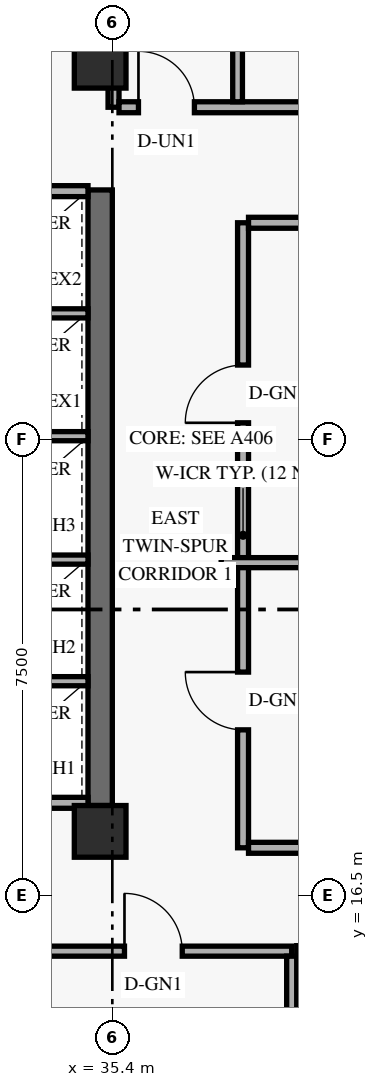
"""IFC4 building model, lengths in metres.
Left out: names, types, materials, properties, quantities, classifications, styles, units other than length and angle.
Written with IfcOpenShell. Run it as: python <this file> out.ifc"""

import sys

from ifc_helpers import new_model, si_unit, direction, frame, frame_2d, origin, origin_2d, place, context, subcontext, project, spatial, rectangle, extrude, element, fill, save


model = new_model("IFC4")
c1 = context("Model", 3, precision=1e-05, world=origin(), true_north=direction((0.0, 1.0)))
c2 = subcontext(c1, "Body", "Model", "MODEL_VIEW")
j1 = project(units=[si_unit("LENGTHUNIT", "METRE"), si_unit("PLANEANGLEUNIT", "RADIAN")], contexts=[c1])
p1 = place(None, origin())
s1 = spatial("IfcSite", under=j1, at=p1, CompositionType="ELEMENT")
p2 = place(p1, origin())
s2 = spatial("IfcBuilding", under=s1, at=p2, CompositionType="ELEMENT")
p3 = place(p2, frame((0.0, 0.0, 121.2)))
s3 = spatial("IfcBuildingStorey", under=s2, at=p3, CompositionType="ELEMENT", Elevation=121.2)
p4 = place(p3, frame((35.2, 17.975, 0.0), z_axis=(0.0, 0.0, 1.0), x_axis=(0.0, 1.0, 0.0)))
e1 = element("IfcWall", 1, at=p4, inside=s3, PredefinedType="SHEAR", context=c2, shape_type="SweptSolid", body=[
    extrude(rectangle(XDim=10.125, YDim=0.4, at=frame_2d((5.062, 0.0))), origin(), (0.0, 0.0, 1.0), 2.749),
])
for number, where, z_axis, x_axis in (
    (2, (35.2, 17.55, 0.0), (0.0, 0.0, 1.0), (1.0, 0.0, 0.0)),
    (3, (35.2, 30.2, 0.0), (0.0, 0.0, 1.0), (1.0, 0.0, 0.0)),
):
    element("IfcColumn", number, at=place(p3, frame(where, z_axis=z_axis, x_axis=x_axis)), inside=s3, PredefinedType="COLUMN", context=c2, shape_type="SweptSolid", body=[
        extrude(rectangle(XDim=0.85, YDim=0.85, at=origin_2d()), origin(), (0.0, 0.0, 1.0), 3.6),
    ])
for number, where, z_axis, x_axis in (
    (4, (32.74, 18.02, 0.0), (0.0, 0.0, 1.0), (1.0, 0.0, 0.0)),
    (5, (32.74, 28.08, 0.0), (0.0, 0.0, 1.0), (1.0, 0.0, 0.0)),
):
    element("IfcWall", number, at=place(p3, frame(where, z_axis=z_axis, x_axis=x_axis)), inside=s3, PredefinedType="STANDARD", context=c2, shape_type="SweptSolid", body=[
        extrude(rectangle(XDim=2.26, YDim=0.18, at=frame_2d((1.13, 0.0))), origin(), (0.0, 0.0, 1.0), 3.36),
    ])
for number, where, z_axis, x_axis in (
    (6, (32.74, 20.02, 0.0), (0.0, 0.0, 1.0), (1.0, 0.0, 0.0)),
    (7, (32.74, 22.02, 0.0), (0.0, 0.0, 1.0), (1.0, 0.0, 0.0)),
    (8, (32.74, 24.05, 0.0), (0.0, 0.0, 1.0), (1.0, 0.0, 0.0)),
    (9, (32.74, 26.07, 0.0), (0.0, 0.0, 1.0), (1.0, 0.0, 0.0)),
):
    element("IfcWall", number, at=place(p3, frame(where, z_axis=z_axis, x_axis=x_axis)), inside=s3, PredefinedType="STANDARD", context=c2, shape_type="SweptSolid", body=[
        extrude(rectangle(XDim=2.26, YDim=0.15, at=frame_2d((1.13, 0.0))), origin(), (0.0, 0.0, 1.0), 3.36),
    ])
p5 = place(p3, frame((32.732, 15.58, 0.0), z_axis=(0.0, 0.0, 1.0), x_axis=(1.0, 0.0, 0.0)))
e10 = element("IfcWall", 10, at=p5, inside=s3, PredefinedType="PARTITIONING", context=c2, shape_type="SweptSolid", body=[
    extrude(rectangle(XDim=5.618, YDim=0.165, at=frame_2d((2.809, 0.0))), origin(), (0.0, 0.0, 1.0), 2.731),
])
p6 = place(p5, frame((2.867, 0.0, 0.0)))
e11 = element("IfcOpeningElement", 11, at=p6, cuts=e10, PredefinedType="OPENING", context=c2, shape_type="SweptSolid", body=[
    extrude(rectangle(XDim=0.95, YDim=2.15, at=frame_2d((0.475, 1.075))), frame((0.0, 0.093, 0.0), z_axis=(0.0, -1.0, 0.0), x_axis=(1.0, 0.0, 0.0)), (0.0, 0.0, 1.0), 0.185),
])
p7 = place(p3, frame((38.35, 9.25, 0.0), z_axis=(0.0, 0.0, 1.0), x_axis=(0.0, 1.0, 0.0)))
e12 = element("IfcWall", 12, at=p7, inside=s3, PredefinedType="PARTITIONING", context=c2, shape_type="SweptSolid", body=[
    extrude(rectangle(XDim=6.248, YDim=0.165, at=frame_2d((3.124, 0.0))), origin(), (0.0, 0.0, 1.0), 2.731),
])
p8 = place(p3, frame((37.55, 17.28, 0.0), z_axis=(0.0, 0.0, 1.0), x_axis=(0.0, 1.0, 0.0)))
e13 = element("IfcWall", 13, at=p8, inside=s3, PredefinedType="STANDARD", context=c2, shape_type="SweptSolid", body=[
    extrude(rectangle(XDim=10.28, YDim=0.18, at=frame_2d((5.14, 0.0))), origin(), (0.0, 0.0, 1.0), 2.731),
])
p9 = place(p8, frame((1.94, 0.0, 0.0)))
e14 = element("IfcOpeningElement", 14, at=p9, cuts=e13, PredefinedType="OPENING", context=c2, shape_type="SweptSolid", body=[
    extrude(rectangle(XDim=0.95, YDim=2.15, at=frame_2d((0.475, 1.075))), frame((0.0, 0.1, 0.0), z_axis=(0.0, -1.0, 0.0), x_axis=(1.0, 0.0, 0.0)), (0.0, 0.0, 1.0), 0.2),
])
p10 = place(p8, frame((6.99, 0.0, 0.0)))
e15 = element("IfcOpeningElement", 15, at=p10, cuts=e13, PredefinedType="OPENING", context=c2, shape_type="SweptSolid", body=[
    extrude(rectangle(XDim=0.95, YDim=2.15, at=frame_2d((0.475, 1.075))), frame((0.0, 0.1, 0.0), z_axis=(0.0, -1.0, 0.0), x_axis=(1.0, 0.0, 0.0)), (0.0, 0.0, 1.0), 0.2),
])
p11 = place(p3, frame((38.433, 15.58, 0.0), z_axis=(0.0, 0.0, 1.0), x_axis=(1.0, 0.0, 0.0)))
e16 = element("IfcWall", 16, at=p11, inside=s3, PredefinedType="STANDARD", context=c2, shape_type="SweptSolid", body=[
    extrude(rectangle(XDim=8.567, YDim=0.18, at=frame_2d((4.284, 0.0))), origin(), (0.0, 0.0, 1.0), 2.731),
])
p12 = place(p11, frame((0.357, 0.0, 0.0)))
e17 = element("IfcOpeningElement", 17, at=p12, cuts=e16, PredefinedType="OPENING", context=c2, shape_type="SweptSolid", body=[
    extrude(rectangle(XDim=0.92, YDim=2.15, at=frame_2d((0.46, 1.075))), frame((0.0, 0.1, 0.0), z_axis=(0.0, -1.0, 0.0), x_axis=(1.0, 0.0, 0.0)), (0.0, 0.0, 1.0), 0.2),
])
p13 = place(p3, frame((37.64, 17.28, 0.0), z_axis=(0.0, 0.0, 1.0), x_axis=(1.0, 0.0, 0.0)))
e18 = element("IfcWall", 18, at=p13, inside=s3, PredefinedType="STANDARD", context=c2, shape_type="SweptSolid", body=[
    extrude(rectangle(XDim=9.36, YDim=0.18, at=frame_2d((4.68, 0.0))), origin(), (0.0, 0.0, 1.0), 2.731),
])
p14 = place(p13, frame((7.238, 0.0, 0.0)))
e19 = element("IfcOpeningElement", 19, at=p14, cuts=e18, PredefinedType="OPENING", context=c2, shape_type="SweptSolid", body=[
    extrude(rectangle(XDim=0.92, YDim=2.15, at=frame_2d((0.46, 1.075))), frame((0.0, 0.1, 0.0), z_axis=(0.0, -1.0, 0.0), x_axis=(1.0, 0.0, 0.0)), (0.0, 0.0, 1.0), 0.2),
])
p15 = place(p3, frame((37.64, 27.56, 0.0), z_axis=(0.0, 0.0, 1.0), x_axis=(1.0, 0.0, 0.0)))
e20 = element("IfcWall", 20, at=p15, inside=s3, PredefinedType="STANDARD", context=c2, shape_type="SweptSolid", body=[
    extrude(rectangle(XDim=9.36, YDim=0.18, at=frame_2d((4.68, 0.0))), origin(), (0.0, 0.0, 1.0), 2.731),
])
p16 = place(p3, frame((35.42, 29.46, 0.0), z_axis=(0.0, 0.0, 1.0), x_axis=(0.0, 1.0, 0.0)))
e21 = element("IfcWall", 21, at=p16, inside=s3, PredefinedType="STANDARD", context=c2, shape_type="SweptSolid", body=[
    extrude(rectangle(XDim=1.89, YDim=0.18, at=frame_2d((0.945, 0.0))), origin(), (0.0, 0.0, 1.0), 2.731),
])
p17 = place(p3, frame((35.51, 29.46, 0.0), z_axis=(0.0, 0.0, 1.0), x_axis=(1.0, 0.0, 0.0)))
e22 = element("IfcWall", 22, at=p17, inside=s3, PredefinedType="STANDARD", context=c2, shape_type="SweptSolid", body=[
    extrude(rectangle(XDim=11.49, YDim=0.18, at=frame_2d((5.745, 0.0))), origin(), (0.0, 0.0, 1.0), 2.731),
])
p18 = place(p17, frame((0.32, 0.0, 0.0)))
e23 = element("IfcOpeningElement", 23, at=p18, cuts=e22, PredefinedType="OPENING", context=c2, shape_type="SweptSolid", body=[
    extrude(rectangle(XDim=0.92, YDim=2.15, at=frame_2d((0.46, 1.075))), frame((0.0, 0.1, 0.0), z_axis=(0.0, -1.0, 0.0), x_axis=(1.0, 0.0, 0.0)), (0.0, 0.0, 1.0), 0.2),
])
p19 = place(p3, frame((37.46, 29.55, 0.0), z_axis=(0.0, 0.0, 1.0), x_axis=(0.0, 1.0, 0.0)))
e24 = element("IfcWall", 24, at=p19, inside=s3, PredefinedType="PLUMBINGWALL", context=c2, shape_type="SweptSolid", body=[
    extrude(rectangle(XDim=2.625, YDim=0.16, at=frame_2d((1.312, 0.0))), origin(), (0.0, 0.0, 1.0), 2.731),
])
p20 = place(p3, frame((37.19, 21.97, 0.0), z_axis=(0.0, 0.0, 1.0), x_axis=(1.0, 0.0, 0.0)))
e25 = element("IfcWall", 25, at=p20, inside=s3, PredefinedType="PARTITIONING", context=c2, shape_type="SweptSolid", body=[
    extrude(rectangle(XDim=5.445, YDim=0.165, at=frame_2d((2.723, 0.0))), origin(), (0.0, 0.0, 1.0), 3.36),
])
p21 = place(p6, origin())
e26 = element("IfcDoor", 26, at=p21, inside=s3, OperationType="SINGLE_SWING_LEFT", PredefinedType="DOOR", context=c2, shape_type="SweptSolid", body=[
    extrude(rectangle(XDim=0.95, YDim=2.15, at=frame_2d((0.475, 1.075))), frame((0.0, 0.025, 0.0), z_axis=(0.0, -1.0, 0.0), x_axis=(1.0, 0.0, 0.0)), (0.0, 0.0, 1.0), 0.05),
])
fill(e11, e26)
p22 = place(p18, origin())
e27 = element("IfcDoor", 27, at=p22, inside=s3, OperationType="SINGLE_SWING_LEFT", PredefinedType="DOOR", context=c2, shape_type="SweptSolid", body=[
    extrude(rectangle(XDim=0.92, YDim=2.15, at=frame_2d((0.46, 1.075))), frame((0.0, 0.025, 0.0), z_axis=(0.0, -1.0, 0.0), x_axis=(1.0, 0.0, 0.0)), (0.0, 0.0, 1.0), 0.05),
])
fill(e23, e27)
p23 = place(p9, origin())
e28 = element("IfcDoor", 28, at=p23, inside=s3, OperationType="SINGLE_SWING_RIGHT", PredefinedType="DOOR", context=c2, shape_type="SweptSolid", body=[
    extrude(rectangle(XDim=0.95, YDim=2.15, at=frame_2d((0.475, 1.075))), frame((0.0, 0.025, 0.0), z_axis=(0.0, -1.0, 0.0), x_axis=(1.0, 0.0, 0.0)), (0.0, 0.0, 1.0), 0.05),
])
fill(e14, e28)
p24 = place(p10, origin())
e29 = element("IfcDoor", 29, at=p24, inside=s3, OperationType="SINGLE_SWING_LEFT", PredefinedType="DOOR", context=c2, shape_type="SweptSolid", body=[
    extrude(rectangle(XDim=0.95, YDim=2.15, at=frame_2d((0.475, 1.075))), frame((0.0, 0.025, 0.0), z_axis=(0.0, -1.0, 0.0), x_axis=(1.0, 0.0, 0.0)), (0.0, 0.0, 1.0), 0.05),
])
fill(e15, e29)
save(model, sys.argv[1])
